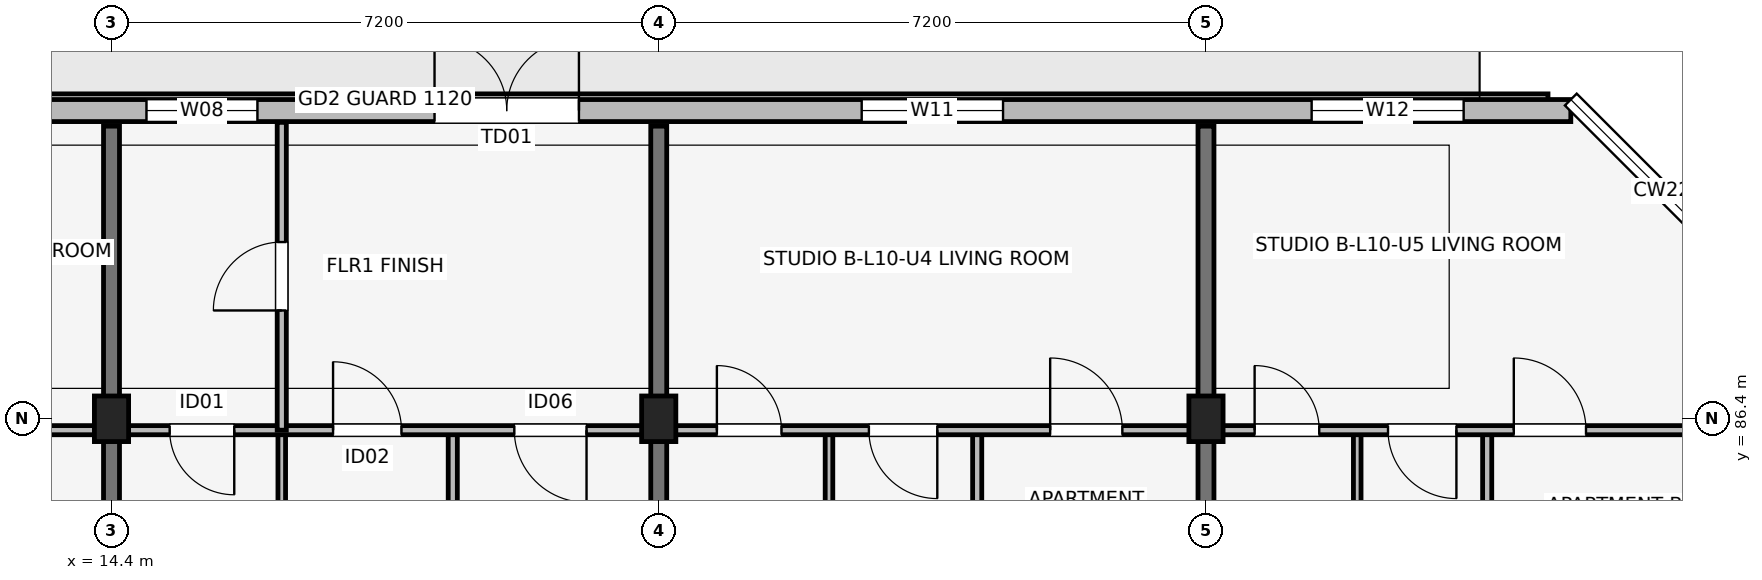
"""IFC4 building model, lengths in metres.
Left out: names, types, materials, properties, quantities, classifications, styles, units other than length and angle.
Written with IfcOpenShell. Run it as: python <this file> out.ifc"""

import sys

from ifc_helpers import new_model, si_unit, direction, frame, frame_2d, origin, origin_2d, place, context, subcontext, project, spatial, rectangle, extrude, element, fill, save


model = new_model("IFC4")
c1 = context("Model", 3, precision=1e-05, world=origin(), true_north=direction((0.0, 1.0)))
c2 = subcontext(c1, "Body", "Model", "MODEL_VIEW")
j1 = project(units=[si_unit("LENGTHUNIT", "METRE"), si_unit("PLANEANGLEUNIT", "RADIAN")], contexts=[c1])
p1 = place(None, origin())
s1 = spatial("IfcSite", under=j1, at=p1, CompositionType="ELEMENT")
p2 = place(p1, origin())
s2 = spatial("IfcBuilding", under=s1, at=p2, CompositionType="ELEMENT")
p3 = place(p2, frame((0.0, 0.0, 33.9)))
s3 = spatial("IfcBuildingStorey", under=s2, at=p3, CompositionType="ELEMENT", Elevation=33.9)
for number, where, z_axis, x_axis in (
    (1, (14.4, 86.4, 0.0), (0.0, 0.0, 1.0), (1.0, 0.0, 0.0)),
    (2, (21.6, 86.4, 0.0), (0.0, 0.0, 1.0), (1.0, 0.0, 0.0)),
    (3, (28.8, 86.4, 0.0), (0.0, 0.0, 1.0), (1.0, 0.0, 0.0)),
):
    element("IfcColumn", number, at=place(p3, frame(where, z_axis=z_axis, x_axis=x_axis)), inside=s3, PredefinedType="COLUMN", context=c2, shape_type="SweptSolid", body=[
        extrude(rectangle(XDim=0.45, YDim=0.6, at=origin_2d()), origin(), (0.0, 0.0, 1.0), 3.15),
    ])
for number, where, z_axis, x_axis in (
    (4, (14.4, 83.85, 0.0), (0.0, 0.0, 1.0), (0.0, 1.0, 0.0)),
    (5, (21.6, 83.85, 0.0), (0.0, 0.0, 1.0), (0.0, 1.0, 0.0)),
    (6, (28.8, 83.85, 0.0), (0.0, 0.0, 1.0), (0.0, 1.0, 0.0)),
):
    element("IfcWall", number, at=place(p3, frame(where, z_axis=z_axis, x_axis=x_axis)), inside=s3, PredefinedType="SHEAR", context=c2, shape_type="SweptSolid", body=[
        extrude(rectangle(XDim=6.4, YDim=0.21, at=frame_2d((3.2, 0.0))), origin(), (0.0, 0.0, 1.0), 3.15),
    ])
p4 = place(p3, frame((33.6, 90.455, 0.0), z_axis=(0.0, 0.0, 1.0), x_axis=(-1.0, 0.0, 0.0)))
e7 = element("IfcWall", 7, at=p4, inside=s3, PredefinedType="SOLIDWALL", context=c2, shape_type="SweptSolid", body=[
    extrude(rectangle(XDim=31.2, YDim=0.29, at=frame_2d((15.6, 0.0))), origin(), (0.0, 0.0, 1.0), 2.48),
])
p5 = place(p4, frame((14.95, 0.0, 0.0), z_axis=(0.0, 0.0, 1.0), x_axis=(-1.0, 0.0, 0.0)))
e8 = element("IfcOpeningElement", 8, at=p5, cuts=e7, PredefinedType="OPENING", context=c2, shape_type="SweptSolid", body=[
    extrude(rectangle(XDim=1.9, YDim=2.2, at=frame_2d((0.95, 1.1))), frame((0.0, 0.155, 0.0), z_axis=(0.0, -1.0, 0.0), x_axis=(1.0, 0.0, 0.0)), (0.0, 0.0, 1.0), 0.31),
])
p6 = place(p4, frame((27.58, 0.0, 0.75)))
e9 = element("IfcOpeningElement", 9, at=p6, cuts=e7, PredefinedType="OPENING", context=c2, shape_type="SweptSolid", body=[
    extrude(rectangle(XDim=1.22, YDim=1.5, at=frame_2d((0.61, 0.75))), frame((0.0, 0.155, 0.0), z_axis=(0.0, -1.0, 0.0), x_axis=(1.0, 0.0, 0.0)), (0.0, 0.0, 1.0), 0.31),
])
p7 = place(p4, frame((22.01, 0.0, 0.7)))
e10 = element("IfcOpeningElement", 10, at=p7, cuts=e7, PredefinedType="OPENING", context=c2, shape_type="SweptSolid", body=[
    extrude(rectangle(XDim=1.58, YDim=1.6, at=frame_2d((0.79, 0.8))), frame((0.0, 0.155, 0.0), z_axis=(0.0, -1.0, 0.0), x_axis=(1.0, 0.0, 0.0)), (0.0, 0.0, 1.0), 0.31),
])
p8 = place(p4, frame((17.28, 0.0, 0.75)))
e11 = element("IfcOpeningElement", 11, at=p8, cuts=e7, PredefinedType="OPENING", context=c2, shape_type="SweptSolid", body=[
    extrude(rectangle(XDim=1.46, YDim=1.55, at=frame_2d((0.73, 0.775))), frame((0.0, 0.155, 0.0), z_axis=(0.0, -1.0, 0.0), x_axis=(1.0, 0.0, 0.0)), (0.0, 0.0, 1.0), 0.31),
])
p9 = place(p4, frame((7.47, 0.0, 0.7)))
e12 = element("IfcOpeningElement", 12, at=p9, cuts=e7, PredefinedType="OPENING", context=c2, shape_type="SweptSolid", body=[
    extrude(rectangle(XDim=1.86, YDim=1.6, at=frame_2d((0.93, 0.8))), frame((0.0, 0.155, 0.0), z_axis=(0.0, -1.0, 0.0), x_axis=(1.0, 0.0, 0.0)), (0.0, 0.0, 1.0), 0.31),
])
p10 = place(p4, frame((1.41, 0.0, 0.7)))
e13 = element("IfcOpeningElement", 13, at=p10, cuts=e7, PredefinedType="OPENING", context=c2, shape_type="SweptSolid", body=[
    extrude(rectangle(XDim=2.0, YDim=1.65, at=frame_2d((1.0, 0.825))), frame((0.0, 0.155, 0.0), z_axis=(0.0, -1.0, 0.0), x_axis=(1.0, 0.0, 0.0)), (0.0, 0.0, 1.0), 0.31),
])
p11 = place(p3, frame((7.34, 86.25, 0.0), z_axis=(0.0, 0.0, 1.0), x_axis=(1.0, 0.0, 0.0)))
e14 = element("IfcWall", 14, at=p11, inside=s3, PredefinedType="PARTITIONING", context=c2, shape_type="SweptSolid", body=[
    extrude(rectangle(XDim=6.92, YDim=0.12, at=frame_2d((3.46, 0.0))), origin(), (0.0, 0.0, 1.0), 2.38),
])
p12 = place(p11, frame((1.475, 0.0, 0.0), z_axis=(0.0, 0.0, 1.0), x_axis=(-1.0, 0.0, 0.0)))
e15 = element("IfcOpeningElement", 15, at=p12, cuts=e14, PredefinedType="OPENING", context=c2, shape_type="SweptSolid", body=[
    extrude(rectangle(XDim=0.85, YDim=2.08, at=frame_2d((0.425, 1.04))), frame((0.0, 0.07, 0.0), z_axis=(0.0, -1.0, 0.0), x_axis=(1.0, 0.0, 0.0)), (0.0, 0.0, 1.0), 0.14),
])
p13 = place(p11, frame((2.625, 0.0, 0.0)))
e16 = element("IfcOpeningElement", 16, at=p13, cuts=e14, PredefinedType="OPENING", context=c2, shape_type="SweptSolid", body=[
    extrude(rectangle(XDim=0.9, YDim=2.08, at=frame_2d((0.45, 1.04))), frame((0.0, 0.07, 0.0), z_axis=(0.0, -1.0, 0.0), x_axis=(1.0, 0.0, 0.0)), (0.0, 0.0, 1.0), 0.14),
])
p14 = place(p11, frame((5.96, 0.0, 0.0), z_axis=(0.0, 0.0, 1.0), x_axis=(-1.0, 0.0, 0.0)))
e17 = element("IfcOpeningElement", 17, at=p14, cuts=e14, PredefinedType="OPENING", context=c2, shape_type="SweptSolid", body=[
    extrude(rectangle(XDim=0.95, YDim=2.08, at=frame_2d((0.475, 1.04))), frame((0.0, 0.07, 0.0), z_axis=(0.0, -1.0, 0.0), x_axis=(1.0, 0.0, 0.0)), (0.0, 0.0, 1.0), 0.14),
])
p15 = place(p3, frame((16.64, 83.7, 0.0), z_axis=(0.0, 0.0, 1.0), x_axis=(0.0, 1.0, 0.0)))
e18 = element("IfcWall", 18, at=p15, inside=s3, PredefinedType="PARTITIONING", context=c2, shape_type="SweptSolid", body=[
    extrude(rectangle(XDim=2.55, YDim=0.1, at=frame_2d((1.275, 0.0))), origin(), (0.0, 0.0, 1.0), 2.38),
])
p16 = place(p3, frame((18.89, 83.7, 0.0), z_axis=(0.0, 0.0, 1.0), x_axis=(0.0, 1.0, 0.0)))
e19 = element("IfcWall", 19, at=p16, inside=s3, PredefinedType="PARTITIONING", context=c2, shape_type="SweptSolid", body=[
    extrude(rectangle(XDim=2.55, YDim=0.12, at=frame_2d((1.275, 0.0))), origin(), (0.0, 0.0, 1.0), 2.38),
])
p17 = place(p3, frame((14.54, 86.25, 0.0), z_axis=(0.0, 0.0, 1.0), x_axis=(1.0, 0.0, 0.0)))
e20 = element("IfcWall", 20, at=p17, inside=s3, PredefinedType="PARTITIONING", context=c2, shape_type="SweptSolid", body=[
    extrude(rectangle(XDim=6.92, YDim=0.12, at=frame_2d((3.46, 0.0))), origin(), (0.0, 0.0, 1.0), 2.38),
])
p18 = place(p17, frame((1.475, 0.0, 0.0), z_axis=(0.0, 0.0, 1.0), x_axis=(-1.0, 0.0, 0.0)))
e21 = element("IfcOpeningElement", 21, at=p18, cuts=e20, PredefinedType="OPENING", context=c2, shape_type="SweptSolid", body=[
    extrude(rectangle(XDim=0.85, YDim=2.08, at=frame_2d((0.425, 1.04))), frame((0.0, 0.07, 0.0), z_axis=(0.0, -1.0, 0.0), x_axis=(1.0, 0.0, 0.0)), (0.0, 0.0, 1.0), 0.14),
])
p19 = place(p17, frame((2.775, 0.0, 0.0)))
e22 = element("IfcOpeningElement", 22, at=p19, cuts=e20, PredefinedType="OPENING", context=c2, shape_type="SweptSolid", body=[
    extrude(rectangle(XDim=0.9, YDim=2.08, at=frame_2d((0.45, 1.04))), frame((0.0, 0.07, 0.0), z_axis=(0.0, -1.0, 0.0), x_axis=(1.0, 0.0, 0.0)), (0.0, 0.0, 1.0), 0.14),
])
p20 = place(p17, frame((6.11, 0.0, 0.0), z_axis=(0.0, 0.0, 1.0), x_axis=(-1.0, 0.0, 0.0)))
e23 = element("IfcOpeningElement", 23, at=p20, cuts=e20, PredefinedType="OPENING", context=c2, shape_type="SweptSolid", body=[
    extrude(rectangle(XDim=0.95, YDim=2.08, at=frame_2d((0.475, 1.04))), frame((0.0, 0.07, 0.0), z_axis=(0.0, -1.0, 0.0), x_axis=(1.0, 0.0, 0.0)), (0.0, 0.0, 1.0), 0.14),
])
p21 = place(p3, frame((16.64, 86.25, 0.0), z_axis=(0.0, 0.0, 1.0), x_axis=(0.0, 1.0, 0.0)))
e24 = element("IfcWall", 24, at=p21, inside=s3, PredefinedType="PARTITIONING", context=c2, shape_type="SweptSolid", body=[
    extrude(rectangle(XDim=4.05, YDim=0.12, at=frame_2d((2.025, 0.0))), origin(), (0.0, 0.0, 1.0), 2.38),
])
p22 = place(p21, frame((1.575, 0.0, 0.0)))
e25 = element("IfcOpeningElement", 25, at=p22, cuts=e24, PredefinedType="OPENING", context=c2, shape_type="SweptSolid", body=[
    extrude(rectangle(XDim=0.9, YDim=2.08, at=frame_2d((0.45, 1.04))), frame((0.0, 0.07, 0.0), z_axis=(0.0, -1.0, 0.0), x_axis=(1.0, 0.0, 0.0)), (0.0, 0.0, 1.0), 0.14),
])
p23 = place(p3, frame((23.84, 83.7, 0.0), z_axis=(0.0, 0.0, 1.0), x_axis=(0.0, 1.0, 0.0)))
e26 = element("IfcWall", 26, at=p23, inside=s3, PredefinedType="PARTITIONING", context=c2, shape_type="SweptSolid", body=[
    extrude(rectangle(XDim=2.55, YDim=0.1, at=frame_2d((1.275, 0.0))), origin(), (0.0, 0.0, 1.0), 2.38),
])
p24 = place(p3, frame((25.79, 83.7, 0.0), z_axis=(0.0, 0.0, 1.0), x_axis=(0.0, 1.0, 0.0)))
e27 = element("IfcWall", 27, at=p24, inside=s3, PredefinedType="PARTITIONING", context=c2, shape_type="SweptSolid", body=[
    extrude(rectangle(XDim=2.55, YDim=0.12, at=frame_2d((1.275, 0.0))), origin(), (0.0, 0.0, 1.0), 2.38),
])
p25 = place(p3, frame((21.74, 86.25, 0.0), z_axis=(0.0, 0.0, 1.0), x_axis=(1.0, 0.0, 0.0)))
e28 = element("IfcWall", 28, at=p25, inside=s3, PredefinedType="PARTITIONING", context=c2, shape_type="SweptSolid", body=[
    extrude(rectangle(XDim=6.92, YDim=0.12, at=frame_2d((3.46, 0.0))), origin(), (0.0, 0.0, 1.0), 2.38),
])
p26 = place(p25, frame((0.625, 0.0, 0.0)))
e29 = element("IfcOpeningElement", 29, at=p26, cuts=e28, PredefinedType="OPENING", context=c2, shape_type="SweptSolid", body=[
    extrude(rectangle(XDim=0.85, YDim=2.08, at=frame_2d((0.425, 1.04))), frame((0.0, 0.07, 0.0), z_axis=(0.0, -1.0, 0.0), x_axis=(1.0, 0.0, 0.0)), (0.0, 0.0, 1.0), 0.14),
])
p27 = place(p25, frame((3.525, 0.0, 0.0), z_axis=(0.0, 0.0, 1.0), x_axis=(-1.0, 0.0, 0.0)))
e30 = element("IfcOpeningElement", 30, at=p27, cuts=e28, PredefinedType="OPENING", context=c2, shape_type="SweptSolid", body=[
    extrude(rectangle(XDim=0.9, YDim=2.08, at=frame_2d((0.45, 1.04))), frame((0.0, 0.07, 0.0), z_axis=(0.0, -1.0, 0.0), x_axis=(1.0, 0.0, 0.0)), (0.0, 0.0, 1.0), 0.14),
])
p28 = place(p25, frame((5.01, 0.0, 0.0)))
e31 = element("IfcOpeningElement", 31, at=p28, cuts=e28, PredefinedType="OPENING", context=c2, shape_type="SweptSolid", body=[
    extrude(rectangle(XDim=0.95, YDim=2.08, at=frame_2d((0.475, 1.04))), frame((0.0, 0.07, 0.0), z_axis=(0.0, -1.0, 0.0), x_axis=(1.0, 0.0, 0.0)), (0.0, 0.0, 1.0), 0.14),
])
p29 = place(p3, frame((30.79, 83.7, 0.0), z_axis=(0.0, 0.0, 1.0), x_axis=(0.0, 1.0, 0.0)))
e32 = element("IfcWall", 32, at=p29, inside=s3, PredefinedType="PARTITIONING", context=c2, shape_type="SweptSolid", body=[
    extrude(rectangle(XDim=2.55, YDim=0.1, at=frame_2d((1.275, 0.0))), origin(), (0.0, 0.0, 1.0), 2.38),
])
p30 = place(p3, frame((32.5, 83.7, 0.0), z_axis=(0.0, 0.0, 1.0), x_axis=(0.0, 1.0, 0.0)))
e33 = element("IfcWall", 33, at=p30, inside=s3, PredefinedType="PARTITIONING", context=c2, shape_type="SweptSolid", body=[
    extrude(rectangle(XDim=2.55, YDim=0.12, at=frame_2d((1.275, 0.0))), origin(), (0.0, 0.0, 1.0), 2.38),
])
p31 = place(p3, frame((28.94, 86.25, 0.0), z_axis=(0.0, 0.0, 1.0), x_axis=(1.0, 0.0, 0.0)))
e34 = element("IfcWall", 34, at=p31, inside=s3, PredefinedType="PARTITIONING", context=c2, shape_type="SweptSolid", body=[
    extrude(rectangle(XDim=6.92, YDim=0.12, at=frame_2d((3.46, 0.0))), origin(), (0.0, 0.0, 1.0), 2.38),
])
p32 = place(p31, frame((0.5, 0.0, 0.0)))
e35 = element("IfcOpeningElement", 35, at=p32, cuts=e34, PredefinedType="OPENING", context=c2, shape_type="SweptSolid", body=[
    extrude(rectangle(XDim=0.85, YDim=2.08, at=frame_2d((0.425, 1.04))), frame((0.0, 0.07, 0.0), z_axis=(0.0, -1.0, 0.0), x_axis=(1.0, 0.0, 0.0)), (0.0, 0.0, 1.0), 0.14),
])
p33 = place(p31, frame((3.155, 0.0, 0.0), z_axis=(0.0, 0.0, 1.0), x_axis=(-1.0, 0.0, 0.0)))
e36 = element("IfcOpeningElement", 36, at=p33, cuts=e34, PredefinedType="OPENING", context=c2, shape_type="SweptSolid", body=[
    extrude(rectangle(XDim=0.9, YDim=2.08, at=frame_2d((0.45, 1.04))), frame((0.0, 0.07, 0.0), z_axis=(0.0, -1.0, 0.0), x_axis=(1.0, 0.0, 0.0)), (0.0, 0.0, 1.0), 0.14),
])
p34 = place(p31, frame((3.91, 0.0, 0.0)))
e37 = element("IfcOpeningElement", 37, at=p34, cuts=e34, PredefinedType="OPENING", context=c2, shape_type="SweptSolid", body=[
    extrude(rectangle(XDim=0.95, YDim=2.08, at=frame_2d((0.475, 1.04))), frame((0.0, 0.07, 0.0), z_axis=(0.0, -1.0, 0.0), x_axis=(1.0, 0.0, 0.0)), (0.0, 0.0, 1.0), 0.14),
])
p35 = place(p5, origin())
e38 = element("IfcDoor", 38, at=p35, inside=s3, OperationType="DOUBLE_DOOR_SINGLE_SWING", PredefinedType="DOOR", context=c2, shape_type="SweptSolid", body=[
    extrude(rectangle(XDim=1.9, YDim=2.2, at=frame_2d((0.95, 1.1))), frame((0.0, 0.025, 0.0), z_axis=(0.0, -1.0, 0.0), x_axis=(1.0, 0.0, 0.0)), (0.0, 0.0, 1.0), 0.05),
])
fill(e8, e38)
p36 = place(p8, origin())
e39 = element("IfcWindow", 39, at=p36, inside=s3, PartitioningType="SINGLE_PANEL", PredefinedType="WINDOW", context=c2, shape_type="SweptSolid", body=[
    extrude(rectangle(XDim=1.46, YDim=1.55, at=frame_2d((0.73, 0.775))), frame((0.0, 0.03, 0.0), z_axis=(0.0, -1.0, 0.0), x_axis=(1.0, 0.0, 0.0)), (0.0, 0.0, 1.0), 0.06),
])
fill(e11, e39)
p37 = place(p9, origin())
e40 = element("IfcWindow", 40, at=p37, inside=s3, PartitioningType="SINGLE_PANEL", PredefinedType="WINDOW", context=c2, shape_type="SweptSolid", body=[
    extrude(rectangle(XDim=1.86, YDim=1.6, at=frame_2d((0.93, 0.8))), frame((0.0, 0.03, 0.0), z_axis=(0.0, -1.0, 0.0), x_axis=(1.0, 0.0, 0.0)), (0.0, 0.0, 1.0), 0.06),
])
fill(e12, e40)
p38 = place(p10, origin())
e41 = element("IfcWindow", 41, at=p38, inside=s3, PartitioningType="SINGLE_PANEL", PredefinedType="WINDOW", context=c2, shape_type="SweptSolid", body=[
    extrude(rectangle(XDim=2.0, YDim=1.65, at=frame_2d((1.0, 0.825))), frame((0.0, 0.03, 0.0), z_axis=(0.0, -1.0, 0.0), x_axis=(1.0, 0.0, 0.0)), (0.0, 0.0, 1.0), 0.06),
])
fill(e13, e41)
p39 = place(p18, origin())
e42 = element("IfcDoor", 42, at=p39, inside=s3, OperationType="SINGLE_SWING_RIGHT", PredefinedType="DOOR", context=c2, shape_type="SweptSolid", body=[
    extrude(rectangle(XDim=0.85, YDim=2.08, at=frame_2d((0.425, 1.04))), frame((0.0, 0.025, 0.0), z_axis=(0.0, -1.0, 0.0), x_axis=(1.0, 0.0, 0.0)), (0.0, 0.0, 1.0), 0.05),
])
fill(e21, e42)
p40 = place(p19, origin())
e43 = element("IfcDoor", 43, at=p40, inside=s3, OperationType="SINGLE_SWING_LEFT", PredefinedType="DOOR", context=c2, shape_type="SweptSolid", body=[
    extrude(rectangle(XDim=0.9, YDim=2.08, at=frame_2d((0.45, 1.04))), frame((0.0, 0.025, 0.0), z_axis=(0.0, -1.0, 0.0), x_axis=(1.0, 0.0, 0.0)), (0.0, 0.0, 1.0), 0.05),
])
fill(e22, e43)
p41 = place(p20, origin())
e44 = element("IfcDoor", 44, at=p41, inside=s3, OperationType="SINGLE_SWING_RIGHT", PredefinedType="DOOR", context=c2, shape_type="SweptSolid", body=[
    extrude(rectangle(XDim=0.95, YDim=2.08, at=frame_2d((0.475, 1.04))), frame((0.0, 0.025, 0.0), z_axis=(0.0, -1.0, 0.0), x_axis=(1.0, 0.0, 0.0)), (0.0, 0.0, 1.0), 0.05),
])
fill(e23, e44)
p42 = place(p22, origin())
e45 = element("IfcDoor", 45, at=p42, inside=s3, OperationType="SINGLE_SWING_LEFT", PredefinedType="DOOR", context=c2, shape_type="SweptSolid", body=[
    extrude(rectangle(XDim=0.9, YDim=2.08, at=frame_2d((0.45, 1.04))), frame((0.0, 0.025, 0.0), z_axis=(0.0, -1.0, 0.0), x_axis=(1.0, 0.0, 0.0)), (0.0, 0.0, 1.0), 0.05),
])
fill(e25, e45)
p43 = place(p26, origin())
e46 = element("IfcDoor", 46, at=p43, inside=s3, OperationType="SINGLE_SWING_LEFT", PredefinedType="DOOR", context=c2, shape_type="SweptSolid", body=[
    extrude(rectangle(XDim=0.85, YDim=2.08, at=frame_2d((0.425, 1.04))), frame((0.0, 0.025, 0.0), z_axis=(0.0, -1.0, 0.0), x_axis=(1.0, 0.0, 0.0)), (0.0, 0.0, 1.0), 0.05),
])
fill(e29, e46)
p44 = place(p27, origin())
e47 = element("IfcDoor", 47, at=p44, inside=s3, OperationType="SINGLE_SWING_RIGHT", PredefinedType="DOOR", context=c2, shape_type="SweptSolid", body=[
    extrude(rectangle(XDim=0.9, YDim=2.08, at=frame_2d((0.45, 1.04))), frame((0.0, 0.025, 0.0), z_axis=(0.0, -1.0, 0.0), x_axis=(1.0, 0.0, 0.0)), (0.0, 0.0, 1.0), 0.05),
])
fill(e30, e47)
p45 = place(p28, origin())
e48 = element("IfcDoor", 48, at=p45, inside=s3, OperationType="SINGLE_SWING_LEFT", PredefinedType="DOOR", context=c2, shape_type="SweptSolid", body=[
    extrude(rectangle(XDim=0.95, YDim=2.08, at=frame_2d((0.475, 1.04))), frame((0.0, 0.025, 0.0), z_axis=(0.0, -1.0, 0.0), x_axis=(1.0, 0.0, 0.0)), (0.0, 0.0, 1.0), 0.05),
])
fill(e31, e48)
p46 = place(p32, origin())
e49 = element("IfcDoor", 49, at=p46, inside=s3, OperationType="SINGLE_SWING_LEFT", PredefinedType="DOOR", context=c2, shape_type="SweptSolid", body=[
    extrude(rectangle(XDim=0.85, YDim=2.08, at=frame_2d((0.425, 1.04))), frame((0.0, 0.025, 0.0), z_axis=(0.0, -1.0, 0.0), x_axis=(1.0, 0.0, 0.0)), (0.0, 0.0, 1.0), 0.05),
])
fill(e35, e49)
p47 = place(p33, origin())
e50 = element("IfcDoor", 50, at=p47, inside=s3, OperationType="SINGLE_SWING_RIGHT", PredefinedType="DOOR", context=c2, shape_type="SweptSolid", body=[
    extrude(rectangle(XDim=0.9, YDim=2.08, at=frame_2d((0.45, 1.04))), frame((0.0, 0.025, 0.0), z_axis=(0.0, -1.0, 0.0), x_axis=(1.0, 0.0, 0.0)), (0.0, 0.0, 1.0), 0.05),
])
fill(e36, e50)
p48 = place(p34, origin())
e51 = element("IfcDoor", 51, at=p48, inside=s3, OperationType="SINGLE_SWING_LEFT", PredefinedType="DOOR", context=c2, shape_type="SweptSolid", body=[
    extrude(rectangle(XDim=0.95, YDim=2.08, at=frame_2d((0.475, 1.04))), frame((0.0, 0.025, 0.0), z_axis=(0.0, -1.0, 0.0), x_axis=(1.0, 0.0, 0.0)), (0.0, 0.0, 1.0), 0.05),
])
fill(e37, e51)
save(model, sys.argv[1])
